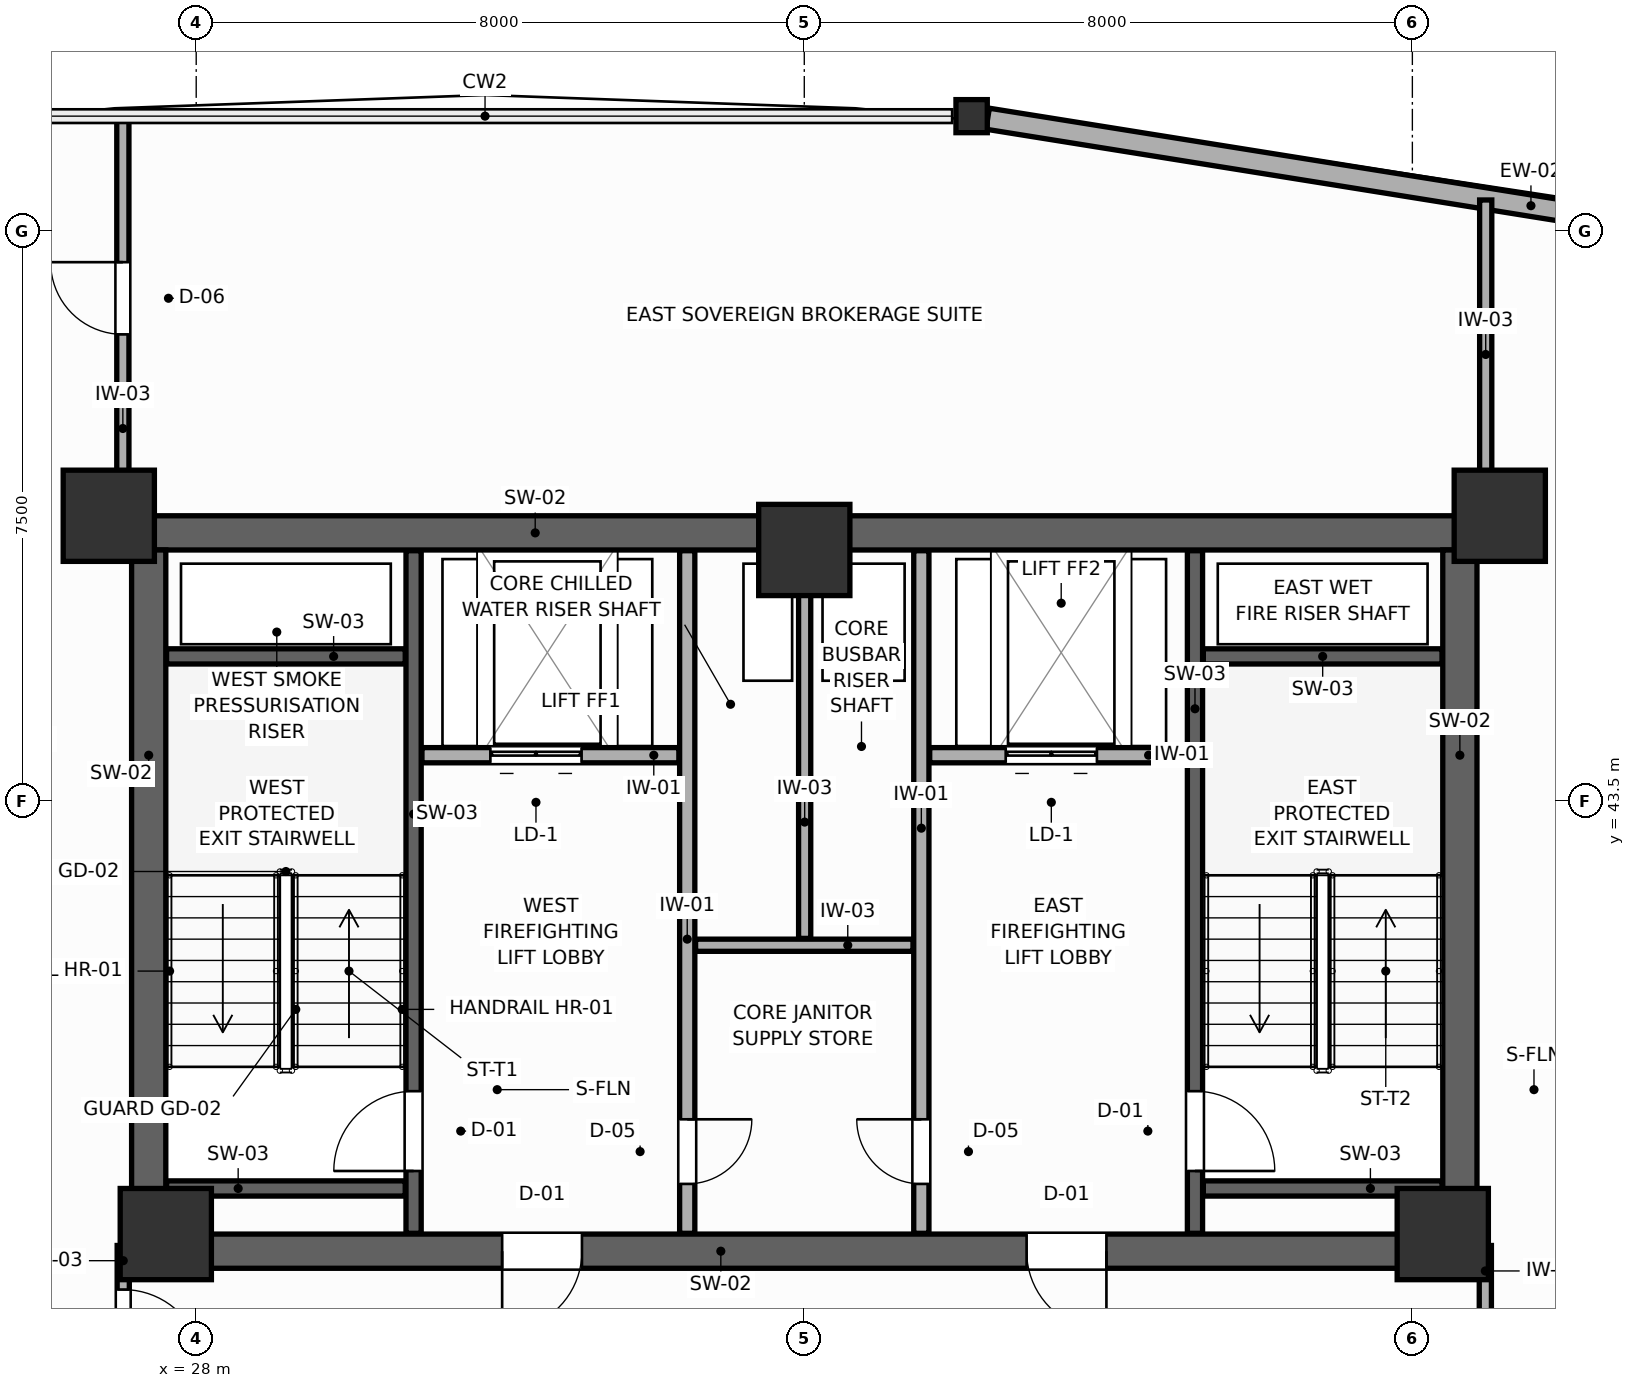
"""IFC4 building model, lengths in metres.
Left out: names, types, materials, properties, quantities, classifications, styles, units other than length and angle.
Written with IfcOpenShell. Run it as: python <this file> out.ifc"""

import sys

from ifc_helpers import new_model, si_unit, direction, frame, frame_2d, origin, origin_2d, place, context, subcontext, project, spatial, rectangle, i_section, extrude, source, transform, mapped, element, fill, save


model = new_model("IFC4")
c1 = context("Model", 3, precision=1e-05, world=origin(), true_north=direction((0.0, 1.0)))
c2 = subcontext(c1, "Body", "Model", "MODEL_VIEW")
j1 = project(units=[si_unit("LENGTHUNIT", "METRE"), si_unit("PLANEANGLEUNIT", "RADIAN")], contexts=[c1])
p1 = place(None, origin())
s1 = spatial("IfcSite", under=j1, at=p1, CompositionType="ELEMENT")
p2 = place(p1, origin())
s2 = spatial("IfcBuilding", under=s1, at=p2, CompositionType="ELEMENT")
p3 = place(p2, frame((0.0, 0.0, 165.0)))
s3 = spatial("IfcBuildingStorey", under=s2, at=p3, CompositionType="ELEMENT", Elevation=165.0)
p4 = place(p3, frame((27.15, 47.025, 0.0), z_axis=(0.0, 0.0, 1.0), x_axis=(1.0, 0.0, 0.0)))
e1 = element("IfcWall", 1, at=p4, inside=s3, PredefinedType="SHEAR", context=c2, shape_type="SweptSolid", body=[
    extrude(rectangle(XDim=17.7, YDim=0.45, at=frame_2d((8.85, 0.0))), origin(), (0.0, 0.0, 1.0), 3.6),
])
p5 = place(p3, frame((27.15, 37.575, 0.0), z_axis=(0.0, 0.0, 1.0), x_axis=(1.0, 0.0, 0.0)))
e2 = element("IfcWall", 2, at=p5, inside=s3, PredefinedType="SHEAR", context=c2, shape_type="SweptSolid", body=[
    extrude(rectangle(XDim=17.7, YDim=0.45, at=frame_2d((8.85, 0.0))), origin(), (0.0, 0.0, 1.0), 3.6),
])
p6 = place(p5, frame((4.875, 0.0, 0.0)))
e3 = element("IfcOpeningElement", 3, at=p6, cuts=e2, PredefinedType="OPENING", context=c2, shape_type="SweptSolid", body=[
    extrude(rectangle(XDim=1.05, YDim=2.1, at=frame_2d((0.525, 1.05))), frame((0.0, 0.235, 0.0), z_axis=(0.0, -1.0, 0.0), x_axis=(1.0, 0.0, 0.0)), (0.0, 0.0, 1.0), 0.47),
])
p7 = place(p5, frame((11.775, 0.0, 0.0)))
e4 = element("IfcOpeningElement", 4, at=p7, cuts=e2, PredefinedType="OPENING", context=c2, shape_type="SweptSolid", body=[
    extrude(rectangle(XDim=1.05, YDim=2.1, at=frame_2d((0.525, 1.05))), frame((0.0, 0.235, 0.0), z_axis=(0.0, -1.0, 0.0), x_axis=(1.0, 0.0, 0.0)), (0.0, 0.0, 1.0), 0.47),
])
for number, where, z_axis, x_axis in (
    (5, (27.375, 37.8, 0.0), (0.0, 0.0, 1.0), (0.0, 1.0, 0.0)),
    (6, (44.625, 37.8, 0.0), (0.0, 0.0, 1.0), (0.0, 1.0, 0.0)),
):
    element("IfcWall", number, at=place(p3, frame(where, z_axis=z_axis, x_axis=x_axis)), inside=s3, PredefinedType="SHEAR", context=c2, shape_type="SweptSolid", body=[
        extrude(rectangle(XDim=9.0, YDim=0.45, at=frame_2d((4.5, 0.0))), origin(), (0.0, 0.0, 1.0), 3.6),
    ])
m1 = source(origin(), c2, "Body", "SweptSolid", [
    extrude(rectangle(XDim=1.2, YDim=1.2, at=origin_2d()), origin(), (0.0, 0.0, 1.0), 3.6),
])
for number, where, z_axis, x_axis in (
    (7, (26.85, 47.25, 0.0), (0.0, 0.0, 1.0), (1.0, 0.0, 0.0)),
    (8, (45.15, 47.25, 0.0), (0.0, 0.0, 1.0), (1.0, 0.0, 0.0)),
    (9, (27.6, 37.8, 0.0), (0.0, 0.0, 1.0), (1.0, 0.0, 0.0)),
    (10, (44.4, 37.8, 0.0), (0.0, 0.0, 1.0), (1.0, 0.0, 0.0)),
    (11, (36.0, 46.8, 0.0), (0.0, 0.0, 1.0), (1.0, 0.0, 0.0)),
):
    element("IfcColumn", number, at=place(p3, frame(where, z_axis=z_axis, x_axis=x_axis)), inside=s3, PredefinedType="COLUMN", context=c2, shape_type="MappedRepresentation", body=[
        mapped(m1, transform((0.0, 0.0, 0.0), scale=1.0)),
    ])
m2 = source(origin(), c2, "Body", "SweptSolid", [
    extrude(i_section(OverallWidth=0.412, OverallDepth=0.435, WebThickness=0.033, FlangeThickness=0.053, FilletRadius=0.015, at=origin_2d()), origin(), (0.0, 0.0, 1.0), 3.6),
])
p8 = place(p3, frame((38.201, 52.508, 0.0), z_axis=(0.0, 0.0, 1.0), x_axis=(1.0, 0.0, 0.0)))
e12 = element("IfcColumn", 12, at=p8, inside=s3, PredefinedType="COLUMN", context=c2, shape_type="MappedRepresentation", body=[
    mapped(m2, transform((0.0, 0.0, 0.0), scale=1.0)),
])
p9 = place(p3, frame((52.708, 50.185, 0.0), z_axis=(0.0, 0.0, 1.0), x_axis=(-0.98742305143, 0.158100339991, 0.0)))
e13 = element("IfcWall", 13, at=p9, inside=s3, PredefinedType="SOLIDWALL", context=c2, shape_type="SweptSolid", body=[
    extrude(rectangle(XDim=14.477, YDim=0.28, at=frame_2d((7.239, 0.0))), origin(), (0.0, 0.0, 1.0), 1.84),
])
p10 = place(p3, frame((30.86, 37.81, 0.0), z_axis=(0.0, 0.0, 1.0), x_axis=(0.0, 1.0, 0.0)))
e14 = element("IfcWall", 14, at=p10, inside=s3, PredefinedType="SHEAR", context=c2, shape_type="SweptSolid", body=[
    extrude(rectangle(XDim=8.98, YDim=0.2, at=frame_2d((4.49, 0.0))), origin(), (0.0, 0.0, 1.0), 3.6),
])
p11 = place(p10, frame((0.82, 0.0, 0.0)))
e15 = element("IfcOpeningElement", 15, at=p11, cuts=e14, PredefinedType="OPENING", context=c2, shape_type="SweptSolid", body=[
    extrude(rectangle(XDim=1.05, YDim=2.1, at=frame_2d((0.525, 1.05))), frame((0.0, 0.11, 0.0), z_axis=(0.0, -1.0, 0.0), x_axis=(1.0, 0.0, 0.0)), (0.0, 0.0, 1.0), 0.22),
])
for number, where, z_axis, x_axis in (
    (16, (27.61, 45.4, 0.0), (0.0, 0.0, 1.0), (1.0, 0.0, 0.0)),
    (17, (27.61, 38.4, 0.0), (0.0, 0.0, 1.0), (1.0, 0.0, 0.0)),
):
    element("IfcWall", number, at=place(p3, frame(where, z_axis=z_axis, x_axis=x_axis)), inside=s3, PredefinedType="SHEAR", context=c2, shape_type="SweptSolid", body=[
        extrude(rectangle(XDim=3.14, YDim=0.2, at=frame_2d((1.57, 0.0))), origin(), (0.0, 0.0, 1.0), 3.6),
    ])
p12 = place(p3, frame((41.14, 37.81, 0.0), z_axis=(0.0, 0.0, 1.0), x_axis=(0.0, 1.0, 0.0)))
e18 = element("IfcWall", 18, at=p12, inside=s3, PredefinedType="SHEAR", context=c2, shape_type="SweptSolid", body=[
    extrude(rectangle(XDim=8.98, YDim=0.2, at=frame_2d((4.49, 0.0))), origin(), (0.0, 0.0, 1.0), 3.6),
])
p13 = place(p12, frame((0.82, 0.0, 0.0)))
e19 = element("IfcOpeningElement", 19, at=p13, cuts=e18, PredefinedType="OPENING", context=c2, shape_type="SweptSolid", body=[
    extrude(rectangle(XDim=1.05, YDim=2.1, at=frame_2d((0.525, 1.05))), frame((0.0, 0.11, 0.0), z_axis=(0.0, -1.0, 0.0), x_axis=(1.0, 0.0, 0.0)), (0.0, 0.0, 1.0), 0.22),
])
for number, where, z_axis, x_axis in (
    (20, (41.25, 45.4, 0.0), (0.0, 0.0, 1.0), (1.0, 0.0, 0.0)),
    (21, (41.25, 38.4, 0.0), (0.0, 0.0, 1.0), (1.0, 0.0, 0.0)),
):
    element("IfcWall", number, at=place(p3, frame(where, z_axis=z_axis, x_axis=x_axis)), inside=s3, PredefinedType="SHEAR", context=c2, shape_type="SweptSolid", body=[
        extrude(rectangle(XDim=3.14, YDim=0.2, at=frame_2d((1.57, 0.0))), origin(), (0.0, 0.0, 1.0), 3.6),
    ])
p14 = place(p3, frame((30.97, 44.1, 0.0), z_axis=(0.0, 0.0, 1.0), x_axis=(1.0, 0.0, 0.0)))
e22 = element("IfcWall", 22, at=p14, inside=s3, PredefinedType="PARTITIONING", context=c2, shape_type="SweptSolid", body=[
    extrude(rectangle(XDim=3.38, YDim=0.2, at=frame_2d((1.69, 0.0))), origin(), (0.0, 0.0, 1.0), 3.4),
])
p15 = place(p14, frame((0.9, 0.0, 0.0)))
e23 = element("IfcOpeningElement", 23, at=p15, cuts=e22, PredefinedType="OPENING", context=c2, shape_type="SweptSolid", body=[
    extrude(rectangle(XDim=1.2, YDim=2.1, at=frame_2d((0.6, 1.05))), frame((0.0, 0.11, 0.0), z_axis=(0.0, -1.0, 0.0), x_axis=(1.0, 0.0, 0.0)), (0.0, 0.0, 1.0), 0.22),
])
p16 = place(p3, frame((37.65, 44.1, 0.0), z_axis=(0.0, 0.0, 1.0), x_axis=(1.0, 0.0, 0.0)))
e24 = element("IfcWall", 24, at=p16, inside=s3, PredefinedType="PARTITIONING", context=c2, shape_type="SweptSolid", body=[
    extrude(rectangle(XDim=3.38, YDim=0.2, at=frame_2d((1.69, 0.0))), origin(), (0.0, 0.0, 1.0), 3.4),
])
p17 = place(p16, frame((1.0, 0.0, 0.0)))
e25 = element("IfcOpeningElement", 25, at=p17, cuts=e24, PredefinedType="OPENING", context=c2, shape_type="SweptSolid", body=[
    extrude(rectangle(XDim=1.2, YDim=2.1, at=frame_2d((0.6, 1.05))), frame((0.0, 0.11, 0.0), z_axis=(0.0, -1.0, 0.0), x_axis=(1.0, 0.0, 0.0)), (0.0, 0.0, 1.0), 0.22),
])
p18 = place(p3, frame((34.46, 37.81, 0.0), z_axis=(0.0, 0.0, 1.0), x_axis=(0.0, 1.0, 0.0)))
e26 = element("IfcWall", 26, at=p18, inside=s3, PredefinedType="PARTITIONING", context=c2, shape_type="SweptSolid", body=[
    extrude(rectangle(XDim=8.98, YDim=0.2, at=frame_2d((4.49, 0.0))), origin(), (0.0, 0.0, 1.0), 3.4),
])
p19 = place(p18, frame((0.65, 0.0, 0.0)))
e27 = element("IfcOpeningElement", 27, at=p19, cuts=e26, PredefinedType="OPENING", context=c2, shape_type="SweptSolid", body=[
    extrude(rectangle(XDim=0.85, YDim=2.05, at=frame_2d((0.425, 1.025))), frame((0.0, 0.11, 0.0), z_axis=(0.0, -1.0, 0.0), x_axis=(1.0, 0.0, 0.0)), (0.0, 0.0, 1.0), 0.22),
])
p20 = place(p3, frame((37.54, 37.81, 0.0), z_axis=(0.0, 0.0, 1.0), x_axis=(0.0, 1.0, 0.0)))
e28 = element("IfcWall", 28, at=p20, inside=s3, PredefinedType="PARTITIONING", context=c2, shape_type="SweptSolid", body=[
    extrude(rectangle(XDim=8.98, YDim=0.2, at=frame_2d((4.49, 0.0))), origin(), (0.0, 0.0, 1.0), 3.4),
])
p21 = place(p20, frame((0.65, 0.0, 0.0)))
e29 = element("IfcOpeningElement", 29, at=p21, cuts=e28, PredefinedType="OPENING", context=c2, shape_type="SweptSolid", body=[
    extrude(rectangle(XDim=0.85, YDim=2.05, at=frame_2d((0.425, 1.025))), frame((0.0, 0.11, 0.0), z_axis=(0.0, -1.0, 0.0), x_axis=(1.0, 0.0, 0.0)), (0.0, 0.0, 1.0), 0.22),
])
p22 = place(p3, frame((34.57, 41.6, 0.0), z_axis=(0.0, 0.0, 1.0), x_axis=(1.0, 0.0, 0.0)))
e30 = element("IfcWall", 30, at=p22, inside=s3, PredefinedType="PARTITIONING", context=c2, shape_type="SweptSolid", body=[
    extrude(rectangle(XDim=2.86, YDim=0.16, at=frame_2d((1.43, 0.0))), origin(), (0.0, 0.0, 1.0), 3.4),
])
p23 = place(p3, frame((36.005, 41.69, 0.0), z_axis=(0.0, 0.0, 1.0), x_axis=(0.0, 1.0, 0.0)))
e31 = element("IfcWall", 31, at=p23, inside=s3, PredefinedType="PARTITIONING", context=c2, shape_type="SweptSolid", body=[
    extrude(rectangle(XDim=5.1, YDim=0.16, at=frame_2d((2.55, 0.0))), origin(), (0.0, 0.0, 1.0), 3.4),
])
p24 = place(p3, frame((27.04, 35.54, 0.0), z_axis=(0.0, 0.0, 1.0), x_axis=(0.0, 1.0, 0.0)))
e32 = element("IfcWall", 32, at=p24, inside=s3, PredefinedType="PARTITIONING", context=c2, shape_type="SweptSolid", body=[
    extrude(rectangle(XDim=2.11, YDim=0.16, at=frame_2d((1.055, 0.0))), origin(), (0.0, 0.0, 1.0), 3.4),
])
p25 = place(p24, frame((0.48, 0.0, 0.0)))
e33 = element("IfcOpeningElement", 33, at=p25, cuts=e32, PredefinedType="OPENING", context=c2, shape_type="SweptSolid", body=[
    extrude(rectangle(XDim=1.05, YDim=2.1, at=frame_2d((0.525, 1.05))), frame((0.0, 0.09, 0.0), z_axis=(0.0, -1.0, 0.0), x_axis=(1.0, 0.0, 0.0)), (0.0, 0.0, 1.0), 0.18),
])
p26 = place(p3, frame((44.96, 35.0, 0.0), z_axis=(0.0, 0.0, 1.0), x_axis=(0.0, 1.0, 0.0)))
e34 = element("IfcWall", 34, at=p26, inside=s3, PredefinedType="PARTITIONING", context=c2, shape_type="SweptSolid", body=[
    extrude(rectangle(XDim=2.65, YDim=0.16, at=frame_2d((1.325, 0.0))), origin(), (0.0, 0.0, 1.0), 3.4),
])
p27 = place(p26, frame((0.75, 0.0, 0.0)))
e35 = element("IfcOpeningElement", 35, at=p27, cuts=e34, PredefinedType="OPENING", context=c2, shape_type="SweptSolid", body=[
    extrude(rectangle(XDim=1.05, YDim=2.1, at=frame_2d((0.525, 1.05))), frame((0.0, 0.09, 0.0), z_axis=(0.0, -1.0, 0.0), x_axis=(1.0, 0.0, 0.0)), (0.0, 0.0, 1.0), 0.18),
])
p28 = place(p3, frame((27.035, 47.34, 0.0), z_axis=(0.0, 0.0, 1.0), x_axis=(0.0, 1.0, 0.0)))
e36 = element("IfcWall", 36, at=p28, inside=s3, PredefinedType="PARTITIONING", context=c2, shape_type="SweptSolid", body=[
    extrude(rectangle(XDim=5.147, YDim=0.16, at=frame_2d((2.574, 0.0))), origin(), (0.0, 0.0, 1.0), 2.13),
])
p29 = place(p28, frame((2.296, 0.0, 0.0)))
e37 = element("IfcOpeningElement", 37, at=p29, cuts=e36, PredefinedType="OPENING", context=c2, shape_type="SweptSolid", body=[
    extrude(rectangle(XDim=0.95, YDim=2.02, at=frame_2d((0.475, 1.01))), frame((0.0, 0.09, 0.0), z_axis=(0.0, -1.0, 0.0), x_axis=(1.0, 0.0, 0.0)), (0.0, 0.0, 1.0), 0.18),
])
p30 = place(p3, frame((44.965, 47.34, 0.0), z_axis=(0.0, 0.0, 1.0), x_axis=(0.0, 1.0, 0.0)))
e38 = element("IfcWall", 38, at=p30, inside=s3, PredefinedType="PARTITIONING", context=c2, shape_type="SweptSolid", body=[
    extrude(rectangle(XDim=4.064, YDim=0.16, at=frame_2d((2.032, 0.0))), origin(), (0.0, 0.0, 1.0), 3.4),
])
p31 = place(p11, origin())
e39 = element("IfcDoor", 39, at=p31, inside=s3, OperationType="SINGLE_SWING_LEFT", PredefinedType="DOOR", context=c2, shape_type="SweptSolid", body=[
    extrude(rectangle(XDim=1.05, YDim=2.1, at=frame_2d((0.525, 1.05))), frame((0.0, 0.025, 0.0), z_axis=(0.0, -1.0, 0.0), x_axis=(1.0, 0.0, 0.0)), (0.0, 0.0, 1.0), 0.05),
])
fill(e15, e39)
p32 = place(p13, frame((1.05, 0.0, 0.0), z_axis=(0.0, 0.0, 1.0), x_axis=(-1.0, 0.0, 0.0)))
e40 = element("IfcDoor", 40, at=p32, inside=s3, OperationType="SINGLE_SWING_RIGHT", PredefinedType="DOOR", context=c2, shape_type="SweptSolid", body=[
    extrude(rectangle(XDim=1.05, YDim=2.1, at=frame_2d((0.525, 1.05))), frame((0.0, 0.025, 0.0), z_axis=(0.0, -1.0, 0.0), x_axis=(1.0, 0.0, 0.0)), (0.0, 0.0, 1.0), 0.05),
])
fill(e19, e40)
p33 = place(p15, origin())
e41 = element("IfcDoor", 41, at=p33, inside=s3, OperationType="DOUBLE_DOOR_SLIDING", PredefinedType="DOOR", context=c2, shape_type="SweptSolid", body=[
    extrude(rectangle(XDim=1.2, YDim=2.1, at=frame_2d((0.6, 1.05))), frame((0.0, 0.025, 0.0), z_axis=(0.0, -1.0, 0.0), x_axis=(1.0, 0.0, 0.0)), (0.0, 0.0, 1.0), 0.05),
])
fill(e23, e41)
p34 = place(p17, origin())
e42 = element("IfcDoor", 42, at=p34, inside=s3, OperationType="DOUBLE_DOOR_SLIDING", PredefinedType="DOOR", context=c2, shape_type="SweptSolid", body=[
    extrude(rectangle(XDim=1.2, YDim=2.1, at=frame_2d((0.6, 1.05))), frame((0.0, 0.025, 0.0), z_axis=(0.0, -1.0, 0.0), x_axis=(1.0, 0.0, 0.0)), (0.0, 0.0, 1.0), 0.05),
])
fill(e25, e42)
p35 = place(p19, frame((0.85, 0.0, 0.0), z_axis=(0.0, 0.0, 1.0), x_axis=(-1.0, 0.0, 0.0)))
e43 = element("IfcDoor", 43, at=p35, inside=s3, OperationType="SINGLE_SWING_LEFT", PredefinedType="DOOR", context=c2, shape_type="SweptSolid", body=[
    extrude(rectangle(XDim=0.85, YDim=2.05, at=frame_2d((0.425, 1.025))), frame((0.0, 0.025, 0.0), z_axis=(0.0, -1.0, 0.0), x_axis=(1.0, 0.0, 0.0)), (0.0, 0.0, 1.0), 0.05),
])
fill(e27, e43)
p36 = place(p21, origin())
e44 = element("IfcDoor", 44, at=p36, inside=s3, OperationType="SINGLE_SWING_RIGHT", PredefinedType="DOOR", context=c2, shape_type="SweptSolid", body=[
    extrude(rectangle(XDim=0.85, YDim=2.05, at=frame_2d((0.425, 1.025))), frame((0.0, 0.025, 0.0), z_axis=(0.0, -1.0, 0.0), x_axis=(1.0, 0.0, 0.0)), (0.0, 0.0, 1.0), 0.05),
])
fill(e29, e44)
p37 = place(p25, frame((1.05, 0.0, 0.0), z_axis=(0.0, 0.0, 1.0), x_axis=(-1.0, 0.0, 0.0)))
e45 = element("IfcDoor", 45, at=p37, inside=s3, OperationType="SINGLE_SWING_RIGHT", PredefinedType="DOOR", context=c2, shape_type="SweptSolid", body=[
    extrude(rectangle(XDim=1.05, YDim=2.1, at=frame_2d((0.525, 1.05))), frame((0.0, 0.025, 0.0), z_axis=(0.0, -1.0, 0.0), x_axis=(1.0, 0.0, 0.0)), (0.0, 0.0, 1.0), 0.05),
])
fill(e33, e45)
p38 = place(p29, origin())
e46 = element("IfcDoor", 46, at=p38, inside=s3, OperationType="SINGLE_SWING_RIGHT", PredefinedType="DOOR", context=c2, shape_type="SweptSolid", body=[
    extrude(rectangle(XDim=0.95, YDim=2.02, at=frame_2d((0.475, 1.01))), frame((0.0, 0.025, 0.0), z_axis=(0.0, -1.0, 0.0), x_axis=(1.0, 0.0, 0.0)), (0.0, 0.0, 1.0), 0.05),
])
fill(e37, e46)
p39 = place(p6, frame((1.05, 0.0, 0.0), z_axis=(0.0, 0.0, 1.0), x_axis=(-1.0, 0.0, 0.0)))
e47 = element("IfcDoor", 47, at=p39, inside=s3, OperationType="SINGLE_SWING_RIGHT", PredefinedType="DOOR", context=c2, shape_type="SweptSolid", body=[
    extrude(rectangle(XDim=1.05, YDim=2.1, at=frame_2d((0.525, 1.05))), frame((0.0, 0.025, 0.0), z_axis=(0.0, -1.0, 0.0), x_axis=(1.0, 0.0, 0.0)), (0.0, 0.0, 1.0), 0.05),
])
fill(e3, e47)
p40 = place(p7, frame((1.05, 0.0, 0.0), z_axis=(0.0, 0.0, 1.0), x_axis=(-1.0, 0.0, 0.0)))
e48 = element("IfcDoor", 48, at=p40, inside=s3, OperationType="SINGLE_SWING_LEFT", PredefinedType="DOOR", context=c2, shape_type="SweptSolid", body=[
    extrude(rectangle(XDim=1.05, YDim=2.1, at=frame_2d((0.525, 1.05))), frame((0.0, 0.025, 0.0), z_axis=(0.0, -1.0, 0.0), x_axis=(1.0, 0.0, 0.0)), (0.0, 0.0, 1.0), 0.05),
])
fill(e4, e48)
save(model, sys.argv[1])
